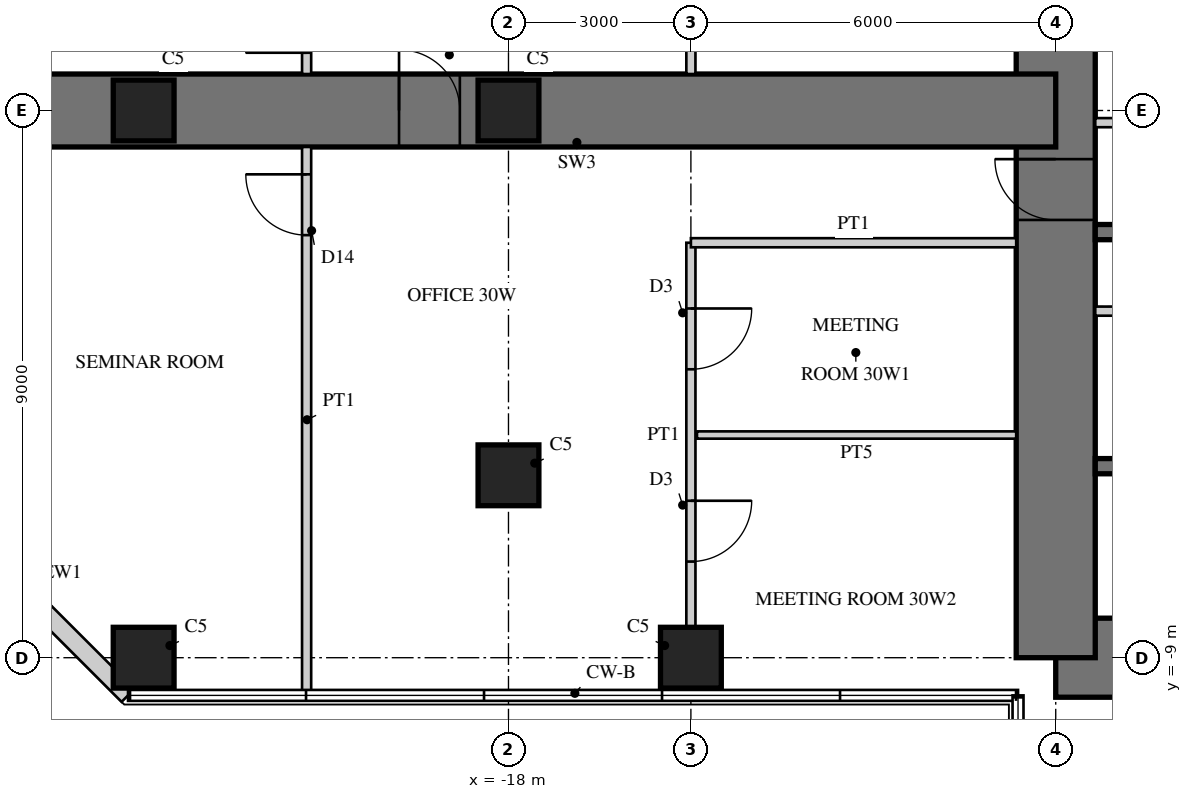
"""IFC4 building model, lengths in metres.
Left out: names, types, materials, properties, quantities, classifications, styles, units other than length and angle.
Written with IfcOpenShell. Run it as: python <this file> out.ifc"""

import sys

from ifc_helpers import new_model, si_unit, direction, frame, frame_2d, origin, origin_2d, place, context, subcontext, project, spatial, rectangle, extrude, element, fill, save


model = new_model("IFC4")
c1 = context("Model", 3, precision=1e-05, world=origin(), true_north=direction((0.0, 1.0)))
c2 = subcontext(c1, "Body", "Model", "MODEL_VIEW")
j1 = project(units=[si_unit("LENGTHUNIT", "METRE"), si_unit("PLANEANGLEUNIT", "RADIAN")], contexts=[c1])
p1 = place(None, origin())
s1 = spatial("IfcSite", under=j1, at=p1, CompositionType="ELEMENT")
p2 = place(p1, origin())
s2 = spatial("IfcBuilding", under=s1, at=p2, CompositionType="ELEMENT")
p3 = place(p2, frame((0.0, 0.0, 124.5)))
s3 = spatial("IfcBuildingStorey", under=s2, at=p3, CompositionType="ELEMENT", Elevation=124.5)
p4 = place(p3, frame((-9.0, -9.0, 0.0), z_axis=(0.0, 0.0, 1.0), x_axis=(1.0, 0.0, 0.0)))
e1 = element("IfcWall", 1, at=p4, inside=s3, PredefinedType="SHEAR", context=c2, shape_type="SweptSolid", body=[
    extrude(rectangle(XDim=18.0, YDim=1.3, at=frame_2d((9.0, 0.0))), origin(), (0.0, 0.0, 1.0), 4.0),
])
p5 = place(p4, frame((9.8, 0.0, 0.0)))
e2 = element("IfcOpeningElement", 2, at=p5, cuts=e1, PredefinedType="OPENING", context=c2, shape_type="SweptSolid", body=[
    extrude(rectangle(XDim=1.0, YDim=2.4, at=frame_2d((0.5, 1.2))), frame((0.0, 0.66, 0.0), z_axis=(0.0, -1.0, 0.0), x_axis=(1.0, 0.0, 0.0)), (0.0, 0.0, 1.0), 1.32),
])
p6 = place(p3, frame((-9.0, 9.0, 0.0), z_axis=(0.0, 0.0, 1.0), x_axis=(0.0, -1.0, 0.0)))
e3 = element("IfcWall", 3, at=p6, inside=s3, PredefinedType="SHEAR", context=c2, shape_type="SweptSolid", body=[
    extrude(rectangle(XDim=18.0, YDim=1.3, at=frame_2d((9.0, 0.0))), origin(), (0.0, 0.0, 1.0), 4.0),
])
p7 = place(p6, frame((9.8, 0.0, 0.0)))
e4 = element("IfcOpeningElement", 4, at=p7, cuts=e3, PredefinedType="OPENING", context=c2, shape_type="SweptSolid", body=[
    extrude(rectangle(XDim=1.0, YDim=2.4, at=frame_2d((0.5, 1.2))), frame((0.0, 0.66, 0.0), z_axis=(0.0, -1.0, 0.0), x_axis=(1.0, 0.0, 0.0)), (0.0, 0.0, 1.0), 1.32),
])
for number, where, z_axis, x_axis in (
    (5, (-1.925, -2.0, 0.0), (0.0, 0.0, 1.0), (-1.0, 0.0, 0.0)),
    (6, (-1.925, -5.85, 0.0), (0.0, 0.0, 1.0), (-1.0, 0.0, 0.0)),
):
    element("IfcWall", number, at=place(p3, frame(where, z_axis=z_axis, x_axis=x_axis)), inside=s3, PredefinedType="SHEAR", context=c2, shape_type="SweptSolid", body=[
        extrude(rectangle(XDim=6.425, YDim=0.25, at=frame_2d((3.212, 0.0))), origin(), (0.0, 0.0, 1.0), 4.0),
    ])
p8 = place(p3, frame((-1.925, -3.3, 0.0), z_axis=(0.0, 0.0, 1.0), x_axis=(-1.0, 0.0, 0.0)))
e7 = element("IfcWall", 7, at=p8, inside=s3, PredefinedType="PARTITIONING", context=c2, shape_type="SweptSolid", body=[
    extrude(rectangle(XDim=6.425, YDim=0.15, at=frame_2d((3.212, 0.0))), origin(), (0.0, 0.0, 1.0), 4.0),
])
p9 = place(p8, frame((0.075, 0.0, 0.0)))
e8 = element("IfcOpeningElement", 8, at=p9, cuts=e7, PredefinedType="OPENING", context=c2, shape_type="SweptSolid", body=[
    extrude(rectangle(XDim=0.8, YDim=2.1, at=frame_2d((0.4, 1.05))), frame((0.0, 0.085, 0.0), z_axis=(0.0, -1.0, 0.0), x_axis=(1.0, 0.0, 0.0)), (0.0, 0.0, 1.0), 0.17),
])
p10 = place(p8, frame((3.675, 0.0, 0.0)))
e9 = element("IfcOpeningElement", 9, at=p10, cuts=e7, PredefinedType="OPENING", context=c2, shape_type="SweptSolid", body=[
    extrude(rectangle(XDim=0.8, YDim=2.1, at=frame_2d((0.4, 1.05))), frame((0.0, 0.085, 0.0), z_axis=(0.0, -1.0, 0.0), x_axis=(1.0, 0.0, 0.0)), (0.0, 0.0, 1.0), 0.17),
])
p11 = place(p3, frame((-9.0, 0.0, 0.0), z_axis=(0.0, 0.0, 1.0), x_axis=(-1.0, 0.0, 0.0)))
e10 = element("IfcWall", 10, at=p11, inside=s3, PredefinedType="SHEAR", context=c2, shape_type="SweptSolid", body=[
    extrude(rectangle(XDim=18.0, YDim=1.2, at=frame_2d((9.0, 0.0))), origin(), (0.0, 0.0, 1.0), 4.0),
])
p12 = place(p11, frame((9.8, 0.0, 0.0)))
e11 = element("IfcOpeningElement", 11, at=p12, cuts=e10, PredefinedType="OPENING", context=c2, shape_type="SweptSolid", body=[
    extrude(rectangle(XDim=1.0, YDim=2.2, at=frame_2d((0.5, 1.1))), frame((0.0, 0.61, 0.0), z_axis=(0.0, -1.0, 0.0), x_axis=(1.0, 0.0, 0.0)), (0.0, 0.0, 1.0), 1.22),
])
for number, where, z_axis, x_axis in (
    (12, (-15.0, -9.0, 0.0), (0.0, 0.0, 1.0), (1.0, 0.0, 0.0)),
    (13, (-24.0, -9.0, 0.0), (0.0, 0.0, 1.0), (1.0, 0.0, 0.0)),
    (14, (-18.0, 0.0, 0.0), (0.0, 0.0, 1.0), (1.0, 0.0, 0.0)),
    (15, (-18.0, -6.0, 0.0), (0.0, 0.0, 1.0), (1.0, 0.0, 0.0)),
    (16, (-24.0, 0.0, 0.0), (0.0, 0.0, 1.0), (1.0, 0.0, 0.0)),
):
    element("IfcColumn", number, at=place(p3, frame(where, z_axis=z_axis, x_axis=x_axis)), inside=s3, PredefinedType="COLUMN", context=c2, shape_type="SweptSolid", body=[
        extrude(rectangle(XDim=1.0, YDim=1.0, at=origin_2d()), origin(), (0.0, 0.0, 1.0), 4.0),
    ])
p13 = place(p3, frame((-27.6, -6.277, 0.0), z_axis=(0.0, 0.0, 1.0), x_axis=(0.707106781187, -0.707106781187, 0.0)))
e17 = element("IfcWall", 17, at=p13, inside=s3, PredefinedType="SOLIDWALL", context=c2, shape_type="SweptSolid", body=[
    extrude(rectangle(XDim=4.728, YDim=0.3, at=frame_2d((2.364, 0.0))), origin(), (0.0, 0.0, 1.0), 3.8),
])
p14 = place(p13, frame((1.914, 0.0, 0.3)))
e18 = element("IfcOpeningElement", 18, at=p14, cuts=e17, PredefinedType="OPENING", context=c2, shape_type="SweptSolid", body=[
    extrude(rectangle(XDim=0.9, YDim=2.4, at=frame_2d((0.45, 1.2))), frame((0.0, 0.16, 0.0), z_axis=(0.0, -1.0, 0.0), x_axis=(1.0, 0.0, 0.0)), (0.0, 0.0, 1.0), 0.32),
])
p15 = place(p3, frame((-2.325, -0.2, 0.0), z_axis=(0.0, 0.0, 1.0), x_axis=(-1.0, 0.0, 0.0)))
e19 = element("IfcWall", 19, at=p15, inside=s3, PredefinedType="PARTITIONING", context=c2, shape_type="SweptSolid", body=[
    extrude(rectangle(XDim=6.025, YDim=0.15, at=frame_2d((3.013, 0.0))), origin(), (0.0, 0.0, 1.0), 3.8),
])
p16 = place(p15, frame((0.4, 0.0, 0.0)))
e20 = element("IfcOpeningElement", 20, at=p16, cuts=e19, PredefinedType="OPENING", context=c2, shape_type="SweptSolid", body=[
    extrude(rectangle(XDim=1.0, YDim=2.1, at=frame_2d((0.5, 1.05))), frame((0.0, 0.085, 0.0), z_axis=(0.0, -1.0, 0.0), x_axis=(1.0, 0.0, 0.0)), (0.0, 0.0, 1.0), 0.17),
])
p17 = place(p3, frame((-15.0, -2.175, 0.0), z_axis=(0.0, 0.0, 1.0), x_axis=(0.0, -1.0, 0.0)))
e21 = element("IfcWall", 21, at=p17, inside=s3, PredefinedType="PARTITIONING", context=c2, shape_type="SweptSolid", body=[
    extrude(rectangle(XDim=6.325, YDim=0.15, at=frame_2d((3.163, 0.0))), origin(), (0.0, 0.0, 1.0), 3.0),
])
p18 = place(p17, frame((1.081, 0.0, 0.0)))
e22 = element("IfcOpeningElement", 22, at=p18, cuts=e21, PredefinedType="OPENING", context=c2, shape_type="SweptSolid", body=[
    extrude(rectangle(XDim=1.0, YDim=2.1, at=frame_2d((0.5, 1.05))), frame((0.0, 0.085, 0.0), z_axis=(0.0, -1.0, 0.0), x_axis=(1.0, 0.0, 0.0)), (0.0, 0.0, 1.0), 0.17),
])
p19 = place(p17, frame((4.244, 0.0, 0.0)))
e23 = element("IfcOpeningElement", 23, at=p19, cuts=e21, PredefinedType="OPENING", context=c2, shape_type="SweptSolid", body=[
    extrude(rectangle(XDim=1.0, YDim=2.1, at=frame_2d((0.5, 1.05))), frame((0.0, 0.085, 0.0), z_axis=(0.0, -1.0, 0.0), x_axis=(1.0, 0.0, 0.0)), (0.0, 0.0, 1.0), 0.17),
])
p20 = place(p3, frame((-9.65, -2.175, 0.0), z_axis=(0.0, 0.0, 1.0), x_axis=(-1.0, 0.0, 0.0)))
e24 = element("IfcWall", 24, at=p20, inside=s3, PredefinedType="PARTITIONING", context=c2, shape_type="SweptSolid", body=[
    extrude(rectangle(XDim=5.35, YDim=0.15, at=frame_2d((2.675, 0.0))), origin(), (0.0, 0.0, 1.0), 3.8),
])
p21 = place(p3, frame((-9.65, -5.337, 0.0), z_axis=(0.0, 0.0, 1.0), x_axis=(-1.0, 0.0, 0.0)))
e25 = element("IfcWall", 25, at=p21, inside=s3, PredefinedType="PLUMBINGWALL", context=c2, shape_type="SweptSolid", body=[
    extrude(rectangle(XDim=5.25, YDim=0.12, at=frame_2d((2.625, 0.0))), origin(), (0.0, 0.0, 1.0), 3.8),
])
p22 = place(p3, frame((-15.0, 8.5, 0.0), z_axis=(0.0, 0.0, 1.0), x_axis=(0.0, -1.0, 0.0)))
e26 = element("IfcWall", 26, at=p22, inside=s3, PredefinedType="PARTITIONING", context=c2, shape_type="SweptSolid", body=[
    extrude(rectangle(XDim=7.9, YDim=0.15, at=frame_2d((3.95, 0.0))), origin(), (0.0, 0.0, 1.0), 3.0),
])
p23 = place(p22, frame((1.45, 0.0, 0.0)))
e27 = element("IfcOpeningElement", 27, at=p23, cuts=e26, PredefinedType="OPENING", context=c2, shape_type="SweptSolid", body=[
    extrude(rectangle(XDim=1.0, YDim=2.1, at=frame_2d((0.5, 1.05))), frame((0.0, 0.085, 0.0), z_axis=(0.0, -1.0, 0.0), x_axis=(1.0, 0.0, 0.0)), (0.0, 0.0, 1.0), 0.17),
])
p24 = place(p22, frame((5.4, 0.0, 0.0)))
e28 = element("IfcOpeningElement", 28, at=p24, cuts=e26, PredefinedType="OPENING", context=c2, shape_type="SweptSolid", body=[
    extrude(rectangle(XDim=1.0, YDim=2.1, at=frame_2d((0.5, 1.05))), frame((0.0, 0.085, 0.0), z_axis=(0.0, -1.0, 0.0), x_axis=(1.0, 0.0, 0.0)), (0.0, 0.0, 1.0), 0.17),
])
p25 = place(p3, frame((-21.32, -0.6, 0.0), z_axis=(0.0, 0.0, 1.0), x_axis=(0.0, -1.0, 0.0)))
e29 = element("IfcWall", 29, at=p25, inside=s3, PredefinedType="PARTITIONING", context=c2, shape_type="SweptSolid", body=[
    extrude(rectangle(XDim=8.98, YDim=0.15, at=frame_2d((4.49, 0.0))), origin(), (0.0, 0.0, 1.0), 3.8),
])
p26 = place(p25, frame((0.45, 0.0, 0.0)))
e30 = element("IfcOpeningElement", 30, at=p26, cuts=e29, PredefinedType="OPENING", context=c2, shape_type="SweptSolid", body=[
    extrude(rectangle(XDim=1.0, YDim=2.2, at=frame_2d((0.5, 1.1))), frame((0.0, 0.085, 0.0), z_axis=(0.0, -1.0, 0.0), x_axis=(1.0, 0.0, 0.0)), (0.0, 0.0, 1.0), 0.17),
])
p27 = place(p3, frame((-21.32, 9.58, 0.0), z_axis=(0.0, 0.0, 1.0), x_axis=(0.0, -1.0, 0.0)))
e31 = element("IfcWall", 31, at=p27, inside=s3, PredefinedType="PARTITIONING", context=c2, shape_type="SweptSolid", body=[
    extrude(rectangle(XDim=8.98, YDim=0.15, at=frame_2d((4.49, 0.0))), origin(), (0.0, 0.0, 1.0), 3.8),
])
p28 = place(p27, frame((4.987, 0.0, 0.0)))
e32 = element("IfcOpeningElement", 32, at=p28, cuts=e31, PredefinedType="OPENING", context=c2, shape_type="SweptSolid", body=[
    extrude(rectangle(XDim=1.0, YDim=2.2, at=frame_2d((0.5, 1.1))), frame((0.0, 0.085, 0.0), z_axis=(0.0, -1.0, 0.0), x_axis=(1.0, 0.0, 0.0)), (0.0, 0.0, 1.0), 0.17),
])
p29 = place(p27, frame((7.63, 0.0, 0.0)))
e33 = element("IfcOpeningElement", 33, at=p29, cuts=e31, PredefinedType="OPENING", context=c2, shape_type="SweptSolid", body=[
    extrude(rectangle(XDim=1.0, YDim=2.2, at=frame_2d((0.5, 1.1))), frame((0.0, 0.085, 0.0), z_axis=(0.0, -1.0, 0.0), x_axis=(1.0, 0.0, 0.0)), (0.0, 0.0, 1.0), 0.17),
])
p30 = place(p18, origin())
e34 = element("IfcDoor", 34, at=p30, inside=s3, OperationType="SINGLE_SWING_LEFT", PredefinedType="DOOR", context=c2, shape_type="SweptSolid", body=[
    extrude(rectangle(XDim=1.0, YDim=2.1, at=frame_2d((0.5, 1.05))), frame((0.0, 0.025, 0.0), z_axis=(0.0, -1.0, 0.0), x_axis=(1.0, 0.0, 0.0)), (0.0, 0.0, 1.0), 0.05),
])
fill(e22, e34)
p31 = place(p19, origin())
e35 = element("IfcDoor", 35, at=p31, inside=s3, OperationType="SINGLE_SWING_LEFT", PredefinedType="DOOR", context=c2, shape_type="SweptSolid", body=[
    extrude(rectangle(XDim=1.0, YDim=2.1, at=frame_2d((0.5, 1.05))), frame((0.0, 0.025, 0.0), z_axis=(0.0, -1.0, 0.0), x_axis=(1.0, 0.0, 0.0)), (0.0, 0.0, 1.0), 0.05),
])
fill(e23, e35)
p32 = place(p26, frame((1.0, 0.0, 0.0), z_axis=(0.0, 0.0, 1.0), x_axis=(-1.0, 0.0, 0.0)))
e36 = element("IfcDoor", 36, at=p32, inside=s3, OperationType="SINGLE_SWING_RIGHT", PredefinedType="DOOR", context=c2, shape_type="SweptSolid", body=[
    extrude(rectangle(XDim=1.0, YDim=2.2, at=frame_2d((0.5, 1.1))), frame((0.0, 0.025, 0.0), z_axis=(0.0, -1.0, 0.0), x_axis=(1.0, 0.0, 0.0)), (0.0, 0.0, 1.0), 0.05),
])
fill(e30, e36)
p33 = place(p29, frame((1.0, 0.0, 0.0), z_axis=(0.0, 0.0, 1.0), x_axis=(-1.0, 0.0, 0.0)))
e37 = element("IfcDoor", 37, at=p33, inside=s3, OperationType="SINGLE_SWING_LEFT", PredefinedType="DOOR", context=c2, shape_type="SweptSolid", body=[
    extrude(rectangle(XDim=1.0, YDim=2.2, at=frame_2d((0.5, 1.1))), frame((0.0, 0.025, 0.0), z_axis=(0.0, -1.0, 0.0), x_axis=(1.0, 0.0, 0.0)), (0.0, 0.0, 1.0), 0.05),
])
fill(e33, e37)
p34 = place(p12, frame((1.0, 0.0, 0.0), z_axis=(0.0, 0.0, 1.0), x_axis=(-1.0, 0.0, 0.0)))
e38 = element("IfcDoor", 38, at=p34, inside=s3, OperationType="SINGLE_SWING_LEFT", PredefinedType="DOOR", context=c2, shape_type="SweptSolid", body=[
    extrude(rectangle(XDim=1.0, YDim=2.2, at=frame_2d((0.5, 1.1))), frame((0.0, 0.025, 0.0), z_axis=(0.0, -1.0, 0.0), x_axis=(1.0, 0.0, 0.0)), (0.0, 0.0, 1.0), 0.05),
])
fill(e11, e38)
p35 = place(p7, frame((1.0, 0.0, 0.0), z_axis=(0.0, 0.0, 1.0), x_axis=(-1.0, 0.0, 0.0)))
e39 = element("IfcDoor", 39, at=p35, inside=s3, OperationType="SINGLE_SWING_RIGHT", PredefinedType="DOOR", context=c2, shape_type="SweptSolid", body=[
    extrude(rectangle(XDim=1.0, YDim=2.4, at=frame_2d((0.5, 1.2))), frame((0.0, -0.005, 0.0), z_axis=(0.0, -1.0, 0.0), x_axis=(1.0, 0.0, 0.0)), (0.0, 0.0, 1.0), 0.05),
])
fill(e4, e39)
save(model, sys.argv[1])
